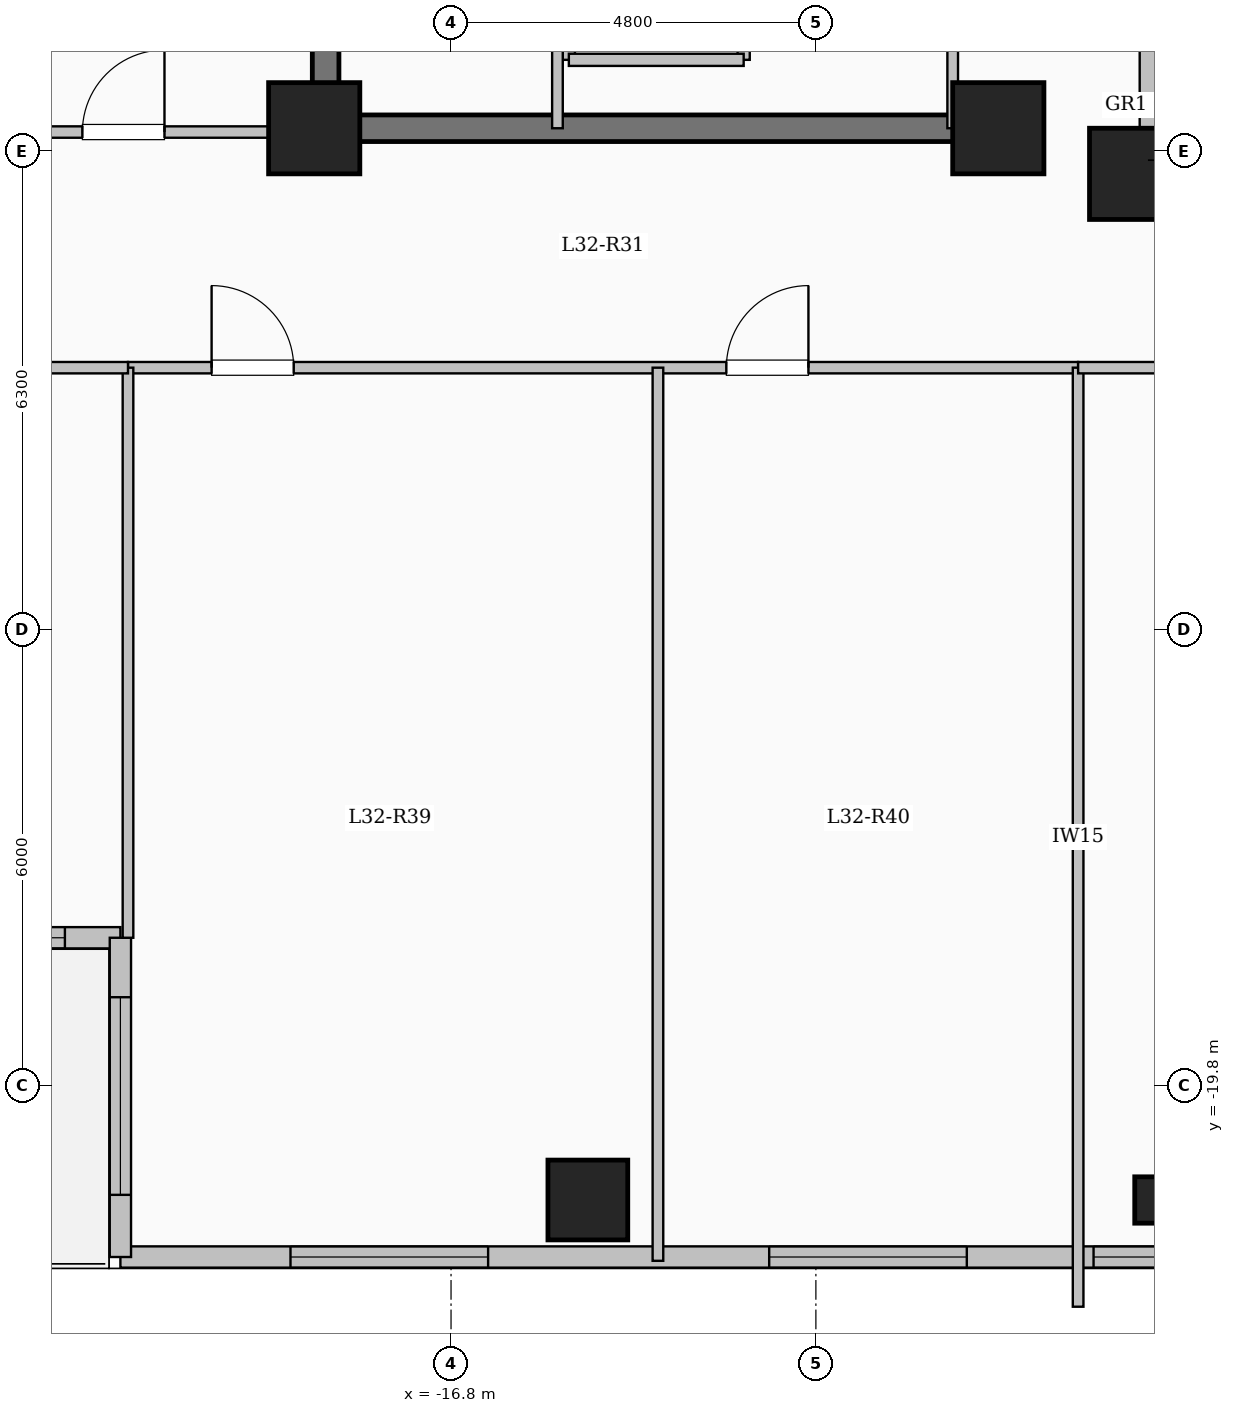
"""IFC4 building model, lengths in metres.
Left out: names, types, materials, properties, quantities, classifications, styles, units other than length and angle.
Written with IfcOpenShell. Run it as: python <this file> out.ifc"""

import sys

from ifc_helpers import new_model, si_unit, direction, frame, frame_2d, origin, origin_2d, place, context, subcontext, project, spatial, rectangle, hollow_circle, extrude, element, fill, save


model = new_model("IFC4")
c1 = context("Model", 3, precision=1e-05, world=origin(), true_north=direction((0.0, 1.0)))
c2 = subcontext(c1, "Body", "Model", "MODEL_VIEW")
j1 = project(units=[si_unit("LENGTHUNIT", "METRE"), si_unit("PLANEANGLEUNIT", "RADIAN")], contexts=[c1])
p1 = place(None, origin())
s1 = spatial("IfcSite", under=j1, at=p1, CompositionType="ELEMENT")
p2 = place(p1, origin())
s2 = spatial("IfcBuilding", under=s1, at=p2, CompositionType="ELEMENT")
p3 = place(p2, frame((0.0, 0.0, 118.5)))
s3 = spatial("IfcBuildingStorey", under=s2, at=p3, CompositionType="ELEMENT", Elevation=118.5)
for number, where, z_axis, x_axis in (
    (1, (-7.8, -7.8, 0.0), (0.0, 0.0, 1.0), (1.0, 0.0, 0.0)),
    (2, (-9.6, -7.2, 0.0), (0.0, 0.0, 1.0), (1.0, 0.0, 0.0)),
    (3, (-18.6, -7.2, 0.0), (0.0, 0.0, 1.0), (1.0, 0.0, 0.0)),
):
    element("IfcColumn", number, at=place(p3, frame(where, z_axis=z_axis, x_axis=x_axis)), inside=s3, PredefinedType="COLUMN", context=c2, shape_type="SweptSolid", body=[
        extrude(rectangle(XDim=1.2, YDim=1.2, at=origin_2d()), origin(), (0.0, 0.0, 1.0), 4.5),
    ])
p4 = place(p3, frame((-15.0, -21.3, 0.0), z_axis=(0.0, 0.0, 1.0), x_axis=(1.0, 0.0, 0.0)))
e4 = element("IfcColumn", 4, at=p4, inside=s3, PredefinedType="COLUMN", context=c2, shape_type="SweptSolid", body=[
    extrude(rectangle(XDim=1.05, YDim=1.05, at=origin_2d()), origin(), (0.0, 0.0, 1.0), 4.5),
])
p5 = place(p3, frame((-7.5, -21.3, 0.0), z_axis=(0.0, 0.0, 1.0), x_axis=(1.0, 0.0, 0.0)))
e5 = element("IfcColumn", 5, at=p5, inside=s3, PredefinedType="COLUMN", context=c2, shape_type="SweptSolid", body=[
    extrude(hollow_circle(Radius=0.305, WallThickness=0.025, at=origin_2d()), origin(), (0.0, 0.0, 1.0), 4.5),
])
p6 = place(p3, frame((-7.62, 7.62, 0.0), z_axis=(0.0, 0.0, 1.0), x_axis=(0.0, -1.0, 0.0)))
e6 = element("IfcWall", 6, at=p6, inside=s3, PredefinedType="SOLIDWALL", context=c2, shape_type="SweptSolid", body=[
    extrude(rectangle(XDim=15.24, YDim=0.24, at=frame_2d((7.62, 0.0))), origin(), (0.0, 0.0, 1.0), 4.2),
])
p7 = place(p6, frame((6.92, 0.0, 0.95)))
e7 = element("IfcOpeningElement", 7, at=p7, cuts=e6, PredefinedType="OPENING", context=c2, shape_type="SweptSolid", body=[
    extrude(rectangle(XDim=1.4, YDim=1.5, at=frame_2d((0.7, 0.75))), frame((0.0, 0.13, 0.0), z_axis=(0.0, -1.0, 0.0), x_axis=(1.0, 0.0, 0.0)), (0.0, 0.0, 1.0), 0.26),
])
p8 = place(p3, frame((-21.15, -17.85, 0.0), z_axis=(0.0, 0.0, 1.0), x_axis=(-1.0, 0.0, 0.0)))
e8 = element("IfcWall", 8, at=p8, inside=s3, PredefinedType="SOLIDWALL", context=c2, shape_type="SweptSolid", body=[
    extrude(rectangle(XDim=5.7, YDim=0.28, at=frame_2d((2.85, 0.0))), origin(), (0.0, 0.0, 1.0), 4.2),
])
p9 = place(p8, frame((2.5, 0.0, 0.0)))
e9 = element("IfcOpeningElement", 9, at=p9, cuts=e8, PredefinedType="OPENING", context=c2, shape_type="SweptSolid", body=[
    extrude(rectangle(XDim=1.1, YDim=2.2, at=frame_2d((0.55, 1.1))), frame((0.0, 0.15, 0.0), z_axis=(0.0, -1.0, 0.0), x_axis=(1.0, 0.0, 0.0)), (0.0, 0.0, 1.0), 0.3),
])
p10 = place(p8, frame((0.73, 0.0, 0.95)))
e10 = element("IfcOpeningElement", 10, at=p10, cuts=e8, PredefinedType="OPENING", context=c2, shape_type="SweptSolid", body=[
    extrude(rectangle(XDim=1.2, YDim=1.5, at=frame_2d((0.6, 0.75))), frame((0.0, 0.15, 0.0), z_axis=(0.0, -1.0, 0.0), x_axis=(1.0, 0.0, 0.0)), (0.0, 0.0, 1.0), 0.3),
])
p11 = place(p3, frame((-7.35, -22.05, 0.0), z_axis=(0.0, 0.0, 1.0), x_axis=(-1.0, 0.0, 0.0)))
e11 = element("IfcWall", 11, at=p11, inside=s3, PredefinedType="SOLIDWALL", context=c2, shape_type="SweptSolid", body=[
    extrude(rectangle(XDim=13.8, YDim=0.28, at=frame_2d((6.9, 0.0))), origin(), (0.0, 0.0, 1.0), 4.2),
])
p12 = place(p11, frame((0.147, 0.0, 0.95)))
e12 = element("IfcOpeningElement", 12, at=p12, cuts=e11, PredefinedType="OPENING", context=c2, shape_type="SweptSolid", body=[
    extrude(rectangle(XDim=0.85, YDim=1.5, at=frame_2d((0.425, 0.75))), frame((0.0, 0.15, 0.0), z_axis=(0.0, -1.0, 0.0), x_axis=(1.0, 0.0, 0.0)), (0.0, 0.0, 1.0), 0.3),
])
p13 = place(p11, frame((2.664, 0.0, 0.85)))
e13 = element("IfcOpeningElement", 13, at=p13, cuts=e11, PredefinedType="OPENING", context=c2, shape_type="SweptSolid", body=[
    extrude(rectangle(XDim=2.6, YDim=2.4, at=frame_2d((1.3, 1.2))), frame((0.0, 0.15, 0.0), z_axis=(0.0, -1.0, 0.0), x_axis=(1.0, 0.0, 0.0)), (0.0, 0.0, 1.0), 0.3),
])
p14 = place(p11, frame((8.962, 0.0, 0.85)))
e14 = element("IfcOpeningElement", 14, at=p14, cuts=e11, PredefinedType="OPENING", context=c2, shape_type="SweptSolid", body=[
    extrude(rectangle(XDim=2.6, YDim=2.4, at=frame_2d((1.3, 1.2))), frame((0.0, 0.15, 0.0), z_axis=(0.0, -1.0, 0.0), x_axis=(1.0, 0.0, 0.0)), (0.0, 0.0, 1.0), 0.3),
])
p15 = place(p3, frame((-21.15, -22.05, 0.0), z_axis=(0.0, 0.0, 1.0), x_axis=(0.0, 1.0, 0.0)))
e15 = element("IfcWall", 15, at=p15, inside=s3, PredefinedType="SOLIDWALL", context=c2, shape_type="SweptSolid", body=[
    extrude(rectangle(XDim=4.2, YDim=0.28, at=frame_2d((2.1, 0.0))), origin(), (0.0, 0.0, 1.0), 4.2),
])
p16 = place(p15, frame((0.818, 0.0, 0.85)))
e16 = element("IfcOpeningElement", 16, at=p16, cuts=e15, PredefinedType="OPENING", context=c2, shape_type="SweptSolid", body=[
    extrude(rectangle(XDim=2.6, YDim=2.4, at=frame_2d((1.3, 1.2))), frame((0.0, 0.15, 0.0), z_axis=(0.0, -1.0, 0.0), x_axis=(1.0, 0.0, 0.0)), (0.0, 0.0, 1.0), 0.3),
])
for number, where, z_axis, x_axis in (
    (17, (-15.25, -6.3, 0.0), (0.0, 0.0, 1.0), (0.0, 1.0, 0.0)),
    (18, (-12.95, -6.3, 0.0), (0.0, 0.0, 1.0), (0.0, 1.0, 0.0)),
):
    element("IfcWall", number, at=place(p3, frame(where, z_axis=z_axis, x_axis=x_axis)), inside=s3, PredefinedType="SOLIDWALL", context=c2, shape_type="SweptSolid", body=[
        extrude(rectangle(XDim=2.6, YDim=0.16, at=frame_2d((1.3, 0.0))), origin(), (0.0, 0.0, 1.0), 4.2),
    ])
p17 = place(p3, frame((-15.25, -6.3, 0.0), z_axis=(0.0, 0.0, 1.0), x_axis=(1.0, 0.0, 0.0)))
e19 = element("IfcWall", 19, at=p17, inside=s3, PredefinedType="SOLIDWALL", context=c2, shape_type="SweptSolid", body=[
    extrude(rectangle(XDim=2.3, YDim=0.16, at=frame_2d((1.15, 0.0))), origin(), (0.0, 0.0, 1.0), 4.2),
])
p18 = place(p3, frame((-18.45, -7.375, 0.0), z_axis=(0.0, 0.0, 1.0), x_axis=(0.0, 1.0, 0.0)))
e20 = element("IfcWall", 20, at=p18, inside=s3, PredefinedType="SHEAR", context=c2, shape_type="SweptSolid", body=[
    extrude(rectangle(XDim=14.05, YDim=0.35, at=frame_2d((7.025, 0.0))), origin(), (0.0, 0.0, 1.0), 4.5),
])
p19 = place(p3, frame((-18.625, -7.2, 0.0), z_axis=(0.0, 0.0, 1.0), x_axis=(1.0, 0.0, 0.0)))
e21 = element("IfcWall", 21, at=p19, inside=s3, PredefinedType="SHEAR", context=c2, shape_type="SweptSolid", body=[
    extrude(rectangle(XDim=8.55, YDim=0.35, at=frame_2d((4.275, 0.0))), origin(), (0.0, 0.0, 1.0), 4.5),
])
p20 = place(p3, frame((-15.4, -7.2, 0.0), z_axis=(0.0, 0.0, 1.0), x_axis=(0.0, 1.0, 0.0)))
e22 = element("IfcWall", 22, at=p20, inside=s3, PredefinedType="PARTITIONING", context=c2, shape_type="SweptSolid", body=[
    extrude(rectangle(XDim=10.45, YDim=0.14, at=frame_2d((5.225, 0.0))), origin(), (0.0, 0.0, 1.0), 4.2),
])
p21 = place(p20, frame((9.25, 0.0, 0.0)))
e23 = element("IfcOpeningElement", 23, at=p21, cuts=e22, PredefinedType="OPENING", context=c2, shape_type="SweptSolid", body=[
    extrude(rectangle(XDim=0.9, YDim=2.08, at=frame_2d((0.45, 1.04))), frame((0.0, 0.08, 0.0), z_axis=(0.0, -1.0, 0.0), x_axis=(1.0, 0.0, 0.0)), (0.0, 0.0, 1.0), 0.16),
])
p22 = place(p3, frame((-10.2, -7.2, 0.0), z_axis=(0.0, 0.0, 1.0), x_axis=(0.0, 1.0, 0.0)))
e24 = element("IfcWall", 24, at=p22, inside=s3, PredefinedType="PARTITIONING", context=c2, shape_type="SweptSolid", body=[
    extrude(rectangle(XDim=9.12, YDim=0.14, at=frame_2d((4.56, 0.0))), origin(), (0.0, 0.0, 1.0), 4.2),
])
p23 = place(p22, frame((1.9, 0.0, 0.0)))
e25 = element("IfcOpeningElement", 25, at=p23, cuts=e24, PredefinedType="OPENING", context=c2, shape_type="SweptSolid", body=[
    extrude(rectangle(XDim=0.95, YDim=2.12, at=frame_2d((0.475, 1.06))), frame((0.0, 0.08, 0.0), z_axis=(0.0, -1.0, 0.0), x_axis=(1.0, 0.0, 0.0)), (0.0, 0.0, 1.0), 0.16),
])
p24 = place(p22, frame((5.8, 0.0, 0.0)))
e26 = element("IfcOpeningElement", 26, at=p24, cuts=e24, PredefinedType="OPENING", context=c2, shape_type="SweptSolid", body=[
    extrude(rectangle(XDim=0.95, YDim=2.12, at=frame_2d((0.475, 1.06))), frame((0.0, 0.08, 0.0), z_axis=(0.0, -1.0, 0.0), x_axis=(1.0, 0.0, 0.0)), (0.0, 0.0, 1.0), 0.16),
])
p25 = place(p3, frame((-21.05, -10.35, 0.0), z_axis=(0.0, 0.0, 1.0), x_axis=(1.0, 0.0, 0.0)))
e27 = element("IfcWall", 27, at=p25, inside=s3, PredefinedType="PARTITIONING", context=c2, shape_type="SweptSolid", body=[
    extrude(rectangle(XDim=12.5, YDim=0.15, at=frame_2d((6.25, 0.0))), origin(), (0.0, 0.0, 1.0), 4.2),
])
p26 = place(p25, frame((1.1, 0.0, 0.0)))
e28 = element("IfcOpeningElement", 28, at=p26, cuts=e27, PredefinedType="OPENING", context=c2, shape_type="SweptSolid", body=[
    extrude(rectangle(XDim=1.08, YDim=2.15, at=frame_2d((0.54, 1.075))), frame((0.0, 0.085, 0.0), z_axis=(0.0, -1.0, 0.0), x_axis=(1.0, 0.0, 0.0)), (0.0, 0.0, 1.0), 0.17),
])
p27 = place(p25, frame((7.872, 0.0, 0.0)))
e29 = element("IfcOpeningElement", 29, at=p27, cuts=e27, PredefinedType="OPENING", context=c2, shape_type="SweptSolid", body=[
    extrude(rectangle(XDim=1.08, YDim=2.15, at=frame_2d((0.54, 1.075))), frame((0.0, 0.085, 0.0), z_axis=(0.0, -1.0, 0.0), x_axis=(1.0, 0.0, 0.0)), (0.0, 0.0, 1.0), 0.17),
])
p28 = place(p3, frame((-14.078, -22.1, 0.0), z_axis=(0.0, 0.0, 1.0), x_axis=(0.0, 1.0, 0.0)))
e30 = element("IfcWall", 30, at=p28, inside=s3, PredefinedType="PARTITIONING", context=c2, shape_type="SweptSolid", body=[
    extrude(rectangle(XDim=11.75, YDim=0.14, at=frame_2d((5.875, 0.0))), origin(), (0.0, 0.0, 1.0), 4.2),
])
p29 = place(p3, frame((-8.55, -22.704, 0.0), z_axis=(0.0, 0.0, 1.0), x_axis=(0.0, 1.0, 0.0)))
e31 = element("IfcWall", 31, at=p29, inside=s3, PredefinedType="PARTITIONING", context=c2, shape_type="SweptSolid", body=[
    extrude(rectangle(XDim=12.354, YDim=0.14, at=frame_2d((6.177, 0.0))), origin(), (0.0, 0.0, 1.0), 4.2),
])
p30 = place(p3, frame((-8.55, -10.35, 0.0), z_axis=(0.0, 0.0, 1.0), x_axis=(1.0, 0.0, 0.0)))
e32 = element("IfcWall", 32, at=p30, inside=s3, PredefinedType="PARTITIONING", context=c2, shape_type="SweptSolid", body=[
    extrude(rectangle(XDim=17.1, YDim=0.15, at=frame_2d((8.55, 0.0))), origin(), (0.0, 0.0, 1.0), 4.2),
])
p31 = place(p30, frame((1.4, 0.0, 0.0)))
e33 = element("IfcOpeningElement", 33, at=p31, cuts=e32, PredefinedType="OPENING", context=c2, shape_type="SweptSolid", body=[
    extrude(rectangle(XDim=1.2, YDim=2.15, at=frame_2d((0.6, 1.075))), frame((0.0, 0.085, 0.0), z_axis=(0.0, -1.0, 0.0), x_axis=(1.0, 0.0, 0.0)), (0.0, 0.0, 1.0), 0.17),
])
p32 = place(p3, frame((-26.88, -7.25, 0.0), z_axis=(0.0, 0.0, 1.0), x_axis=(1.0, 0.0, 0.0)))
e34 = element("IfcWall", 34, at=p32, inside=s3, PredefinedType="PARTITIONING", context=c2, shape_type="SweptSolid", body=[
    extrude(rectangle(XDim=8.43, YDim=0.15, at=frame_2d((4.215, 0.0))), origin(), (0.0, 0.0, 1.0), 4.2),
])
p33 = place(p32, frame((5.23, 0.0, 0.0)))
e35 = element("IfcOpeningElement", 35, at=p33, cuts=e34, PredefinedType="OPENING", context=c2, shape_type="SweptSolid", body=[
    extrude(rectangle(XDim=1.08, YDim=2.15, at=frame_2d((0.54, 1.075))), frame((0.0, 0.085, 0.0), z_axis=(0.0, -1.0, 0.0), x_axis=(1.0, 0.0, 0.0)), (0.0, 0.0, 1.0), 0.17),
])
p34 = place(p3, frame((-21.05, -17.85, 0.0), z_axis=(0.0, 0.0, 1.0), x_axis=(0.0, 1.0, 0.0)))
e36 = element("IfcWall", 36, at=p34, inside=s3, PredefinedType="PARTITIONING", context=c2, shape_type="SweptSolid", body=[
    extrude(rectangle(XDim=7.5, YDim=0.14, at=frame_2d((3.75, 0.0))), origin(), (0.0, 0.0, 1.0), 4.2),
])
p35 = place(p3, frame((-26.88, -10.35, 0.0), z_axis=(0.0, 0.0, 1.0), x_axis=(1.0, 0.0, 0.0)))
e37 = element("IfcWall", 37, at=p35, inside=s3, PredefinedType="PARTITIONING", context=c2, shape_type="SweptSolid", body=[
    extrude(rectangle(XDim=5.83, YDim=0.15, at=frame_2d((2.915, 0.0))), origin(), (0.0, 0.0, 1.0), 4.2),
])
p36 = place(p35, frame((2.44, 0.0, 0.0)))
e38 = element("IfcOpeningElement", 38, at=p36, cuts=e37, PredefinedType="OPENING", context=c2, shape_type="SweptSolid", body=[
    extrude(rectangle(XDim=0.95, YDim=2.15, at=frame_2d((0.475, 1.075))), frame((0.0, 0.085, 0.0), z_axis=(0.0, -1.0, 0.0), x_axis=(1.0, 0.0, 0.0)), (0.0, 0.0, 1.0), 0.17),
])
p37 = place(p10, origin())
e39 = element("IfcWindow", 39, at=p37, inside=s3, PartitioningType="SINGLE_PANEL", PredefinedType="WINDOW", context=c2, shape_type="SweptSolid", body=[
    extrude(rectangle(XDim=1.2, YDim=1.5, at=frame_2d((0.6, 0.75))), frame((0.0, 0.03, 0.0), z_axis=(0.0, -1.0, 0.0), x_axis=(1.0, 0.0, 0.0)), (0.0, 0.0, 1.0), 0.06),
])
fill(e10, e39)
p38 = place(p12, origin())
e40 = element("IfcWindow", 40, at=p38, inside=s3, PartitioningType="SINGLE_PANEL", PredefinedType="WINDOW", context=c2, shape_type="SweptSolid", body=[
    extrude(rectangle(XDim=0.85, YDim=1.5, at=frame_2d((0.425, 0.75))), frame((0.0, 0.03, 0.0), z_axis=(0.0, -1.0, 0.0), x_axis=(1.0, 0.0, 0.0)), (0.0, 0.0, 1.0), 0.06),
])
fill(e12, e40)
p39 = place(p13, origin())
e41 = element("IfcWindow", 41, at=p39, inside=s3, PartitioningType="SINGLE_PANEL", PredefinedType="WINDOW", context=c2, shape_type="SweptSolid", body=[
    extrude(rectangle(XDim=2.6, YDim=2.4, at=frame_2d((1.3, 1.2))), frame((0.0, 0.03, 0.0), z_axis=(0.0, -1.0, 0.0), x_axis=(1.0, 0.0, 0.0)), (0.0, 0.0, 1.0), 0.06),
])
fill(e13, e41)
p40 = place(p14, origin())
e42 = element("IfcWindow", 42, at=p40, inside=s3, PartitioningType="SINGLE_PANEL", PredefinedType="WINDOW", context=c2, shape_type="SweptSolid", body=[
    extrude(rectangle(XDim=2.6, YDim=2.4, at=frame_2d((1.3, 1.2))), frame((0.0, 0.03, 0.0), z_axis=(0.0, -1.0, 0.0), x_axis=(1.0, 0.0, 0.0)), (0.0, 0.0, 1.0), 0.06),
])
fill(e14, e42)
p41 = place(p16, origin())
e43 = element("IfcWindow", 43, at=p41, inside=s3, PartitioningType="SINGLE_PANEL", PredefinedType="WINDOW", context=c2, shape_type="SweptSolid", body=[
    extrude(rectangle(XDim=2.6, YDim=2.4, at=frame_2d((1.3, 1.2))), frame((0.0, 0.03, 0.0), z_axis=(0.0, -1.0, 0.0), x_axis=(1.0, 0.0, 0.0)), (0.0, 0.0, 1.0), 0.06),
])
fill(e16, e43)
p42 = place(p26, origin())
e44 = element("IfcDoor", 44, at=p42, inside=s3, OperationType="SINGLE_SWING_LEFT", PredefinedType="DOOR", context=c2, shape_type="SweptSolid", body=[
    extrude(rectangle(XDim=1.08, YDim=2.15, at=frame_2d((0.54, 1.075))), frame((0.0, 0.025, 0.0), z_axis=(0.0, -1.0, 0.0), x_axis=(1.0, 0.0, 0.0)), (0.0, 0.0, 1.0), 0.05),
])
fill(e28, e44)
p43 = place(p27, origin())
e45 = element("IfcDoor", 45, at=p43, inside=s3, OperationType="SINGLE_SWING_RIGHT", PredefinedType="DOOR", context=c2, shape_type="SweptSolid", body=[
    extrude(rectangle(XDim=1.08, YDim=2.15, at=frame_2d((0.54, 1.075))), frame((0.0, 0.025, 0.0), z_axis=(0.0, -1.0, 0.0), x_axis=(1.0, 0.0, 0.0)), (0.0, 0.0, 1.0), 0.05),
])
fill(e29, e45)
p44 = place(p33, origin())
e46 = element("IfcDoor", 46, at=p44, inside=s3, OperationType="SINGLE_SWING_RIGHT", PredefinedType="DOOR", context=c2, shape_type="SweptSolid", body=[
    extrude(rectangle(XDim=1.08, YDim=2.15, at=frame_2d((0.54, 1.075))), frame((0.0, 0.025, 0.0), z_axis=(0.0, -1.0, 0.0), x_axis=(1.0, 0.0, 0.0)), (0.0, 0.0, 1.0), 0.05),
])
fill(e35, e46)
save(model, sys.argv[1])
